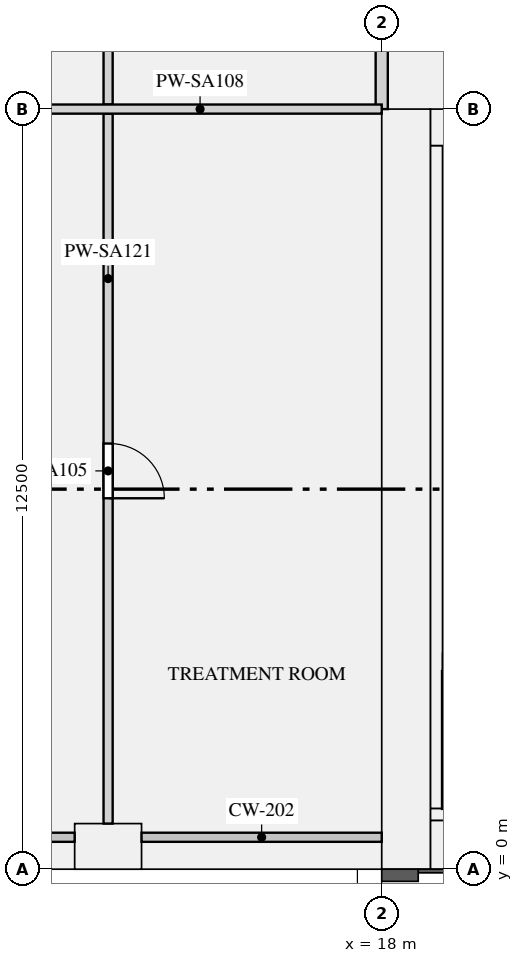
"""IFC4 building model, lengths in metres.
Left out: names, types, materials, properties, quantities, classifications, styles, units other than length and angle.
Written with IfcOpenShell. Run it as: python <this file> out.ifc"""

import sys

from ifc_helpers import new_model, si_unit, direction, frame, frame_2d, origin, origin_2d, place, context, subcontext, project, spatial, rectangle, extrude, element, fill, save


model = new_model("IFC4")
c1 = context("Model", 3, precision=1e-05, world=origin(), true_north=direction((0.0, 1.0)))
c2 = subcontext(c1, "Body", "Model", "MODEL_VIEW")
j1 = project(units=[si_unit("LENGTHUNIT", "METRE"), si_unit("PLANEANGLEUNIT", "RADIAN")], contexts=[c1])
p1 = place(None, origin())
s1 = spatial("IfcSite", under=j1, at=p1, CompositionType="ELEMENT")
p2 = place(p1, origin())
s2 = spatial("IfcBuilding", under=s1, at=p2, CompositionType="ELEMENT")
p3 = place(p2, frame((0.0, 0.0, 77.25)))
s3 = spatial("IfcBuildingStorey", under=s2, at=p3, CompositionType="ELEMENT", Elevation=77.25)
p4 = place(p3, frame((13.5, 0.375, 0.0), z_axis=(0.0, 0.0, 1.0), x_axis=(1.0, 0.0, 0.0)))
e1 = element("IfcColumn", 1, at=p4, inside=s3, PredefinedType="USERDEFINED", context=c2, shape_type="SweptSolid", body=[
    extrude(rectangle(XDim=1.1, YDim=0.75, at=origin_2d()), origin(), (0.0, 0.0, 1.0), 6.3),
])
p5 = place(p3, frame((18.4, 0.0, 0.0), z_axis=(0.0, 0.0, 1.0), x_axis=(0.0, 1.0, 0.0)))
e2 = element("IfcWall", 2, at=p5, inside=s3, PredefinedType="SHEAR", context=c2, shape_type="SweptSolid", body=[
    extrude(rectangle(XDim=12.5, YDim=0.8, at=frame_2d((6.25, 0.0))), origin(), (0.0, 0.0, 1.0), 6.3),
])
p6 = place(p3, frame((18.8, 0.4, 0.0), z_axis=(0.0, 0.0, 1.0), x_axis=(1.0, 0.0, 0.0)))
e3 = element("IfcWall", 3, at=p6, inside=s3, PredefinedType="SHEAR", context=c2, shape_type="SweptSolid", body=[
    extrude(rectangle(XDim=34.4, YDim=0.8, at=frame_2d((17.2, 0.0))), origin(), (0.0, 0.0, 1.0), 6.3),
])
p7 = place(p3, frame((18.8, 12.2, 0.0), z_axis=(0.0, 0.0, 1.0), x_axis=(1.0, 0.0, 0.0)))
e4 = element("IfcWall", 4, at=p7, inside=s3, PredefinedType="SHEAR", context=c2, shape_type="SweptSolid", body=[
    extrude(rectangle(XDim=34.4, YDim=0.6, at=frame_2d((17.2, 0.0))), origin(), (0.0, 0.0, 1.0), 6.3),
])
p8 = place(p7, frame((4.675, 0.0, 0.0)))
e5 = element("IfcOpeningElement", 5, at=p8, cuts=e4, PredefinedType="OPENING", context=c2, shape_type="SweptSolid", body=[
    extrude(rectangle(XDim=1.2, YDim=2.1, at=frame_2d((0.6, 1.05))), frame((0.0, 0.31, 0.0), z_axis=(0.0, -1.0, 0.0), x_axis=(1.0, 0.0, 0.0)), (0.0, 0.0, 1.0), 0.62),
])
p9 = place(p7, frame((7.525, 0.0, 0.0)))
e6 = element("IfcOpeningElement", 6, at=p9, cuts=e4, PredefinedType="OPENING", context=c2, shape_type="SweptSolid", body=[
    extrude(rectangle(XDim=1.2, YDim=2.1, at=frame_2d((0.6, 1.05))), frame((0.0, 0.31, 0.0), z_axis=(0.0, -1.0, 0.0), x_axis=(1.0, 0.0, 0.0)), (0.0, 0.0, 1.0), 0.62),
])
p10 = place(p7, frame((10.375, 0.0, 0.0)))
e7 = element("IfcOpeningElement", 7, at=p10, cuts=e4, PredefinedType="OPENING", context=c2, shape_type="SweptSolid", body=[
    extrude(rectangle(XDim=1.2, YDim=2.1, at=frame_2d((0.6, 1.05))), frame((0.0, 0.31, 0.0), z_axis=(0.0, -1.0, 0.0), x_axis=(1.0, 0.0, 0.0)), (0.0, 0.0, 1.0), 0.62),
])
p11 = place(p7, frame((13.225, 0.0, 0.0)))
e8 = element("IfcOpeningElement", 8, at=p11, cuts=e4, PredefinedType="OPENING", context=c2, shape_type="SweptSolid", body=[
    extrude(rectangle(XDim=1.2, YDim=2.1, at=frame_2d((0.6, 1.05))), frame((0.0, 0.31, 0.0), z_axis=(0.0, -1.0, 0.0), x_axis=(1.0, 0.0, 0.0)), (0.0, 0.0, 1.0), 0.62),
])
p12 = place(p7, frame((16.075, 0.0, 0.0)))
e9 = element("IfcOpeningElement", 9, at=p12, cuts=e4, PredefinedType="OPENING", context=c2, shape_type="SweptSolid", body=[
    extrude(rectangle(XDim=1.2, YDim=2.1, at=frame_2d((0.6, 1.05))), frame((0.0, 0.31, 0.0), z_axis=(0.0, -1.0, 0.0), x_axis=(1.0, 0.0, 0.0)), (0.0, 0.0, 1.0), 0.62),
])
p13 = place(p7, frame((18.925, 0.0, 0.0)))
e10 = element("IfcOpeningElement", 10, at=p13, cuts=e4, PredefinedType="OPENING", context=c2, shape_type="SweptSolid", body=[
    extrude(rectangle(XDim=1.2, YDim=2.1, at=frame_2d((0.6, 1.05))), frame((0.0, 0.31, 0.0), z_axis=(0.0, -1.0, 0.0), x_axis=(1.0, 0.0, 0.0)), (0.0, 0.0, 1.0), 0.62),
])
p14 = place(p7, frame((21.775, 0.0, 0.0)))
e11 = element("IfcOpeningElement", 11, at=p14, cuts=e4, PredefinedType="OPENING", context=c2, shape_type="SweptSolid", body=[
    extrude(rectangle(XDim=1.2, YDim=2.1, at=frame_2d((0.6, 1.05))), frame((0.0, 0.31, 0.0), z_axis=(0.0, -1.0, 0.0), x_axis=(1.0, 0.0, 0.0)), (0.0, 0.0, 1.0), 0.62),
])
p15 = place(p7, frame((24.375, 0.0, 0.0)))
e12 = element("IfcOpeningElement", 12, at=p15, cuts=e4, PredefinedType="OPENING", context=c2, shape_type="SweptSolid", body=[
    extrude(rectangle(XDim=1.1, YDim=2.1, at=frame_2d((0.55, 1.05))), frame((0.0, 0.31, 0.0), z_axis=(0.0, -1.0, 0.0), x_axis=(1.0, 0.0, 0.0)), (0.0, 0.0, 1.0), 0.62),
])
p16 = place(p7, frame((26.625, 0.0, 0.0)))
e13 = element("IfcOpeningElement", 13, at=p16, cuts=e4, PredefinedType="OPENING", context=c2, shape_type="SweptSolid", body=[
    extrude(rectangle(XDim=1.1, YDim=2.1, at=frame_2d((0.55, 1.05))), frame((0.0, 0.31, 0.0), z_axis=(0.0, -1.0, 0.0), x_axis=(1.0, 0.0, 0.0)), (0.0, 0.0, 1.0), 0.62),
])
p17 = place(p7, frame((28.875, 0.0, 0.0)))
e14 = element("IfcOpeningElement", 14, at=p17, cuts=e4, PredefinedType="OPENING", context=c2, shape_type="SweptSolid", body=[
    extrude(rectangle(XDim=1.1, YDim=2.1, at=frame_2d((0.55, 1.05))), frame((0.0, 0.31, 0.0), z_axis=(0.0, -1.0, 0.0), x_axis=(1.0, 0.0, 0.0)), (0.0, 0.0, 1.0), 0.62),
])
p18 = place(p7, frame((1.35, 0.0, 0.0)))
e15 = element("IfcOpeningElement", 15, at=p18, cuts=e4, PredefinedType="OPENING", context=c2, shape_type="SweptSolid", body=[
    extrude(rectangle(XDim=1.2, YDim=2.1, at=frame_2d((0.6, 1.05))), frame((0.0, 0.31, 0.0), z_axis=(0.0, -1.0, 0.0), x_axis=(1.0, 0.0, 0.0)), (0.0, 0.0, 1.0), 0.62),
])
p19 = place(p7, frame((31.85, 0.0, 0.0)))
e16 = element("IfcOpeningElement", 16, at=p19, cuts=e4, PredefinedType="OPENING", context=c2, shape_type="SweptSolid", body=[
    extrude(rectangle(XDim=1.2, YDim=2.1, at=frame_2d((0.6, 1.05))), frame((0.0, 0.31, 0.0), z_axis=(0.0, -1.0, 0.0), x_axis=(1.0, 0.0, 0.0)), (0.0, 0.0, 1.0), 0.62),
])
p20 = place(p3, frame((18.9, 1.0, 0.0), z_axis=(0.0, 0.0, 1.0), x_axis=(0.0, 1.0, 0.0)))
e17 = element("IfcWall", 17, at=p20, inside=s3, PredefinedType="SHEAR", context=c2, shape_type="SweptSolid", body=[
    extrude(rectangle(XDim=10.9, YDim=0.2, at=frame_2d((5.45, 0.0))), origin(), (0.0, 0.0, 1.0), 6.3),
])
p21 = place(p3, frame((18.8, 0.9, 0.0), z_axis=(0.0, 0.0, 1.0), x_axis=(1.0, 0.0, 0.0)))
e18 = element("IfcWall", 18, at=p21, inside=s3, PredefinedType="SHEAR", context=c2, shape_type="SweptSolid", body=[
    extrude(rectangle(XDim=34.4, YDim=0.2, at=frame_2d((17.2, 0.0))), origin(), (0.0, 0.0, 1.0), 6.3),
])
p22 = place(p3, frame((19.0, 3.4, 0.0), z_axis=(0.0, 0.0, 1.0), x_axis=(1.0, 0.0, 0.0)))
e19 = element("IfcWall", 19, at=p22, inside=s3, PredefinedType="SHEAR", context=c2, shape_type="SweptSolid", body=[
    extrude(rectangle(XDim=2.55, YDim=0.3, at=frame_2d((1.275, 0.0))), origin(), (0.0, 0.0, 1.0), 6.3),
])
p23 = place(p22, frame((0.675, 0.0, 0.0)))
e20 = element("IfcOpeningElement", 20, at=p23, cuts=e19, PredefinedType="OPENING", context=c2, shape_type="SweptSolid", body=[
    extrude(rectangle(XDim=1.2, YDim=2.1, at=frame_2d((0.6, 1.05))), frame((0.0, 0.16, 0.0), z_axis=(0.0, -1.0, 0.0), x_axis=(1.0, 0.0, 0.0)), (0.0, 0.0, 1.0), 0.32),
])
p24 = place(p3, frame((18.0, 12.5, 0.0), z_axis=(0.0, 0.0, 1.0), x_axis=(0.0, 1.0, 0.0)))
e21 = element("IfcWall", 21, at=p24, inside=s3, PredefinedType="PARTITIONING", context=c2, shape_type="SweptSolid", body=[
    extrude(rectangle(XDim=3.4, YDim=0.2, at=frame_2d((1.7, 0.0))), origin(), (0.0, 0.0, 1.0), 5.98),
])
p25 = place(p3, frame((5.25, 12.5, 0.0), z_axis=(0.0, 0.0, 1.0), x_axis=(1.0, 0.0, 0.0)))
e22 = element("IfcWall", 22, at=p25, inside=s3, PredefinedType="PARTITIONING", context=c2, shape_type="SweptSolid", body=[
    extrude(rectangle(XDim=12.75, YDim=0.15, at=frame_2d((6.375, 0.0))), origin(), (0.0, 0.0, 1.0), 5.98),
])
p26 = place(p25, frame((5.875, 0.0, 0.0)))
e23 = element("IfcOpeningElement", 23, at=p26, cuts=e22, PredefinedType="OPENING", context=c2, shape_type="SweptSolid", body=[
    extrude(rectangle(XDim=0.9, YDim=2.1, at=frame_2d((0.45, 1.05))), frame((0.0, 0.085, 0.0), z_axis=(0.0, -1.0, 0.0), x_axis=(1.0, 0.0, 0.0)), (0.0, 0.0, 1.0), 0.17),
])
p27 = place(p3, frame((13.5, 0.75, 0.0), z_axis=(0.0, 0.0, 1.0), x_axis=(0.0, 1.0, 0.0)))
e24 = element("IfcWall", 24, at=p27, inside=s3, PredefinedType="PARTITIONING", context=c2, shape_type="SweptSolid", body=[
    extrude(rectangle(XDim=11.675, YDim=0.15, at=frame_2d((5.837, 0.0))), origin(), (0.0, 0.0, 1.0), 5.98),
])
p28 = place(p27, frame((5.35, 0.0, 0.0)))
e25 = element("IfcOpeningElement", 25, at=p28, cuts=e24, PredefinedType="OPENING", context=c2, shape_type="SweptSolid", body=[
    extrude(rectangle(XDim=0.9, YDim=2.1, at=frame_2d((0.45, 1.05))), frame((0.0, 0.085, 0.0), z_axis=(0.0, -1.0, 0.0), x_axis=(1.0, 0.0, 0.0)), (0.0, 0.0, 1.0), 0.17),
])
p29 = place(p3, frame((13.5, 12.575, 0.0), z_axis=(0.0, 0.0, 1.0), x_axis=(0.0, 1.0, 0.0)))
e26 = element("IfcWall", 26, at=p29, inside=s3, PredefinedType="PARTITIONING", context=c2, shape_type="SweptSolid", body=[
    extrude(rectangle(XDim=10.325, YDim=0.15, at=frame_2d((5.163, 0.0))), origin(), (0.0, 0.0, 1.0), 5.98),
])
p30 = place(p29, frame((1.475, 0.0, 0.0)))
e27 = element("IfcOpeningElement", 27, at=p30, cuts=e26, PredefinedType="OPENING", context=c2, shape_type="SweptSolid", body=[
    extrude(rectangle(XDim=0.9, YDim=2.1, at=frame_2d((0.45, 1.05))), frame((0.0, 0.085, 0.0), z_axis=(0.0, -1.0, 0.0), x_axis=(1.0, 0.0, 0.0)), (0.0, 0.0, 1.0), 0.17),
])
p31 = place(p29, frame((6.45, 0.0, 0.0)))
e28 = element("IfcOpeningElement", 28, at=p31, cuts=e26, PredefinedType="OPENING", context=c2, shape_type="SweptSolid", body=[
    extrude(rectangle(XDim=1.5, YDim=2.1, at=frame_2d((0.75, 1.05))), frame((0.0, 0.085, 0.0), z_axis=(0.0, -1.0, 0.0), x_axis=(1.0, 0.0, 0.0)), (0.0, 0.0, 1.0), 0.17),
])
p32 = place(p28, frame((0.9, 0.0, 0.0), z_axis=(0.0, 0.0, 1.0), x_axis=(-1.0, 0.0, 0.0)))
e29 = element("IfcDoor", 29, at=p32, inside=s3, OperationType="SINGLE_SWING_RIGHT", PredefinedType="DOOR", context=c2, shape_type="SweptSolid", body=[
    extrude(rectangle(XDim=0.9, YDim=2.1, at=frame_2d((0.45, 1.05))), frame((0.0, 0.025, 0.0), z_axis=(0.0, -1.0, 0.0), x_axis=(1.0, 0.0, 0.0)), (0.0, 0.0, 1.0), 0.05),
])
fill(e25, e29)
save(model, sys.argv[1])
